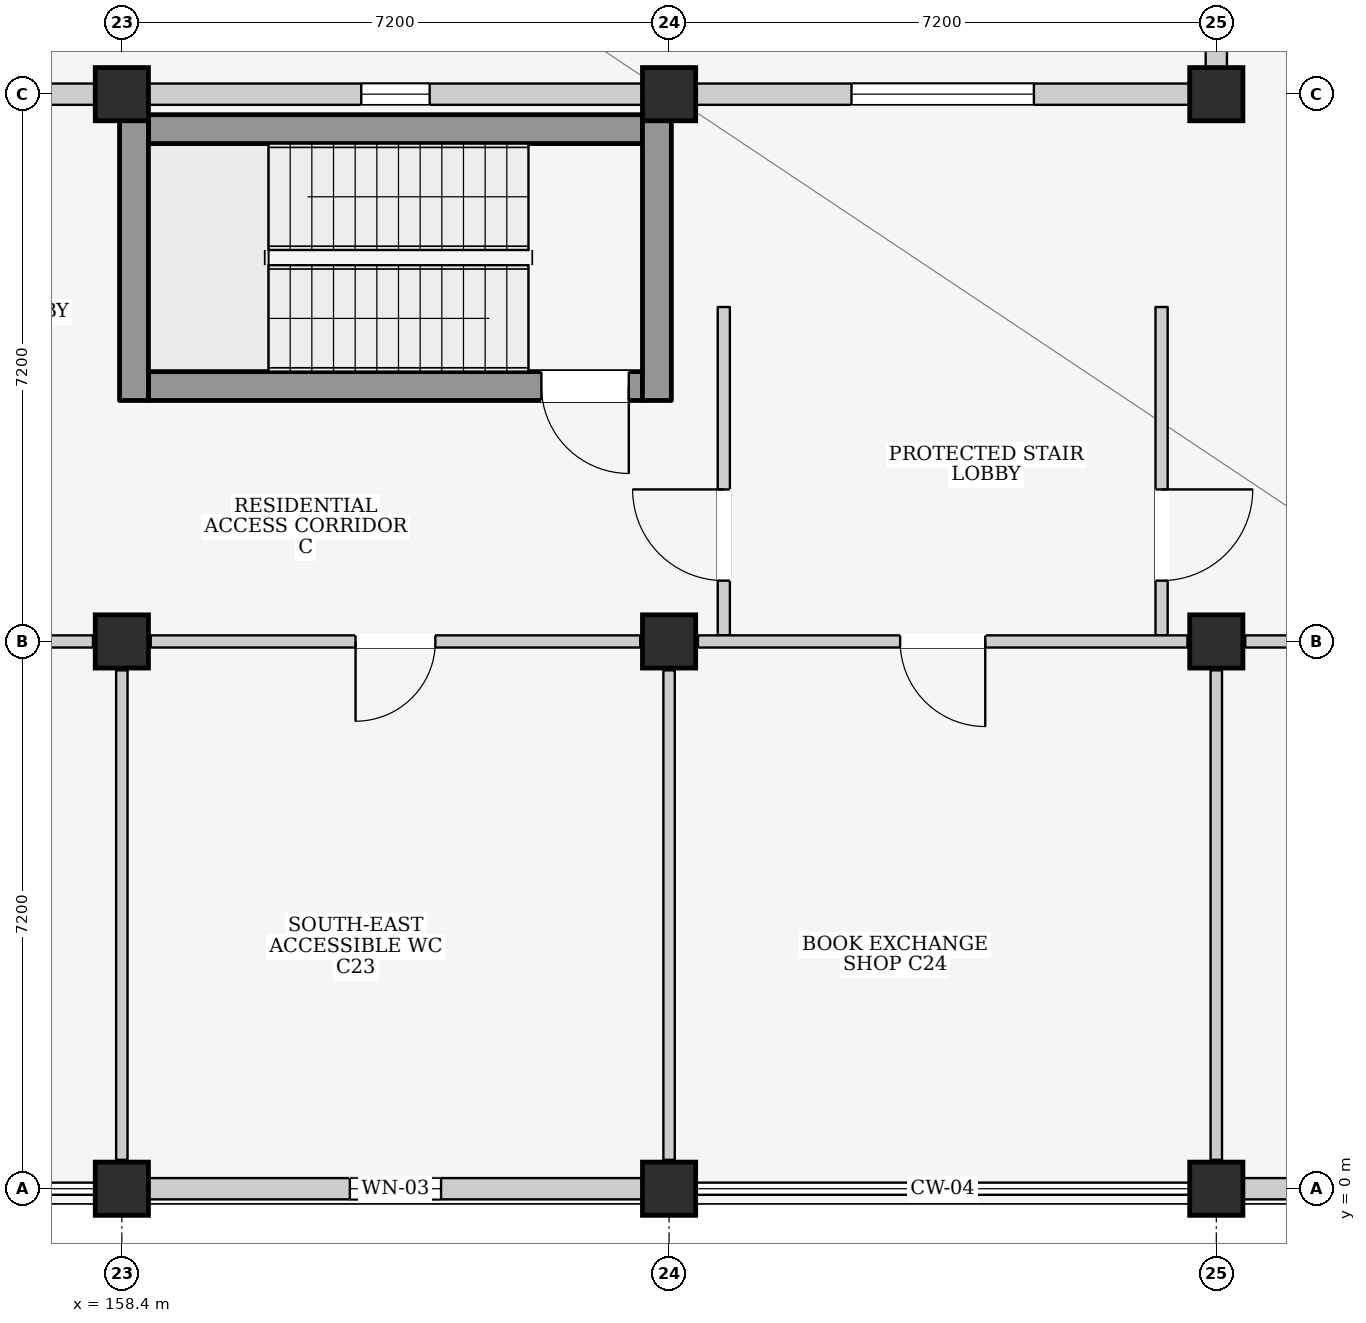
"""IFC4 building model, lengths in metres.
Left out: names, types, materials, properties, quantities, classifications, styles, units other than length and angle.
Written with IfcOpenShell. Run it as: python <this file> out.ifc"""

import sys

from ifc_helpers import new_model, si_unit, direction, frame, frame_2d, origin, origin_2d, place, context, subcontext, project, spatial, rectangle, extrude, element, fill, save


model = new_model("IFC4")
c1 = context("Model", 3, precision=1e-05, world=origin(), true_north=direction((0.0, 1.0)))
c2 = subcontext(c1, "Body", "Model", "MODEL_VIEW")
j1 = project(units=[si_unit("LENGTHUNIT", "METRE"), si_unit("PLANEANGLEUNIT", "RADIAN")], contexts=[c1])
p1 = place(None, origin())
s1 = spatial("IfcSite", under=j1, at=p1, CompositionType="ELEMENT")
p2 = place(p1, origin())
s2 = spatial("IfcBuilding", under=s1, at=p2, CompositionType="ELEMENT")
p3 = place(p2, origin())
s3 = spatial("IfcBuildingStorey", under=s2, at=p3, CompositionType="ELEMENT", Elevation=0.0)
for number, where, z_axis, x_axis in (
    (1, (158.4, 0.0, 0.0), (0.0, 0.0, 1.0), (1.0, 0.0, 0.0)),
    (2, (158.4, 7.2, 0.0), (0.0, 0.0, 1.0), (1.0, 0.0, 0.0)),
    (3, (158.4, 14.4, 0.0), (0.0, 0.0, 1.0), (1.0, 0.0, 0.0)),
    (4, (165.6, 0.0, 0.0), (0.0, 0.0, 1.0), (1.0, 0.0, 0.0)),
    (5, (165.6, 7.2, 0.0), (0.0, 0.0, 1.0), (1.0, 0.0, 0.0)),
    (6, (165.6, 14.4, 0.0), (0.0, 0.0, 1.0), (1.0, 0.0, 0.0)),
    (7, (172.8, 0.0, 0.0), (0.0, 0.0, 1.0), (1.0, 0.0, 0.0)),
    (8, (172.8, 7.2, 0.0), (0.0, 0.0, 1.0), (1.0, 0.0, 0.0)),
    (9, (172.8, 14.4, 0.0), (0.0, 0.0, 1.0), (1.0, 0.0, 0.0)),
):
    element("IfcColumn", number, at=place(p3, frame(where, z_axis=z_axis, x_axis=x_axis)), inside=s3, PredefinedType="COLUMN", context=c2, shape_type="SweptSolid", body=[
        extrude(rectangle(XDim=0.7, YDim=0.7, at=origin_2d()), origin(), (0.0, 0.0, 1.0), 4.5),
    ])
p4 = place(p3, frame((151.55, 14.4, 0.0), z_axis=(0.0, 0.0, 1.0), x_axis=(1.0, 0.0, 0.0)))
e10 = element("IfcWall", 10, at=p4, inside=s3, PredefinedType="ELEMENTEDWALL", context=c2, shape_type="SweptSolid", body=[
    extrude(rectangle(XDim=6.5, YDim=0.28, at=frame_2d((3.25, 0.0))), origin(), (0.0, 0.0, 1.0), 3.435),
])
p5 = place(p4, frame((2.6, 0.0, 0.0)))
e11 = element("IfcOpeningElement", 11, at=p5, cuts=e10, PredefinedType="OPENING", context=c2, shape_type="SweptSolid", body=[
    extrude(rectangle(XDim=1.2, YDim=2.15, at=frame_2d((0.6, 1.075))), frame((0.0, 0.155, 0.0), z_axis=(0.0, -1.0, 0.0), x_axis=(1.0, 0.0, 0.0)), (0.0, 0.0, 1.0), 0.31),
])
p6 = place(p3, frame((158.75, 0.0, 0.0), z_axis=(0.0, 0.0, 1.0), x_axis=(1.0, 0.0, 0.0)))
e12 = element("IfcWall", 12, at=p6, inside=s3, PredefinedType="ELEMENTEDWALL", context=c2, shape_type="SweptSolid", body=[
    extrude(rectangle(XDim=6.5, YDim=0.28, at=frame_2d((3.25, 0.0))), origin(), (0.0, 0.0, 1.0), 3.665),
])
p7 = place(p6, frame((2.65, 0.0, 0.95)))
e13 = element("IfcOpeningElement", 13, at=p7, cuts=e12, PredefinedType="OPENING", context=c2, shape_type="SweptSolid", body=[
    extrude(rectangle(XDim=1.2, YDim=1.35, at=frame_2d((0.6, 0.675))), frame((0.0, 0.155, 0.0), z_axis=(0.0, -1.0, 0.0), x_axis=(1.0, 0.0, 0.0)), (0.0, 0.0, 1.0), 0.31),
])
p8 = place(p3, frame((158.75, 14.4, 0.0), z_axis=(0.0, 0.0, 1.0), x_axis=(1.0, 0.0, 0.0)))
e14 = element("IfcWall", 14, at=p8, inside=s3, PredefinedType="ELEMENTEDWALL", context=c2, shape_type="SweptSolid", body=[
    extrude(rectangle(XDim=6.5, YDim=0.28, at=frame_2d((3.25, 0.0))), origin(), (0.0, 0.0, 1.0), 3.435),
])
p9 = place(p8, frame((2.8, 0.0, 0.95)))
e15 = element("IfcOpeningElement", 15, at=p9, cuts=e14, PredefinedType="OPENING", context=c2, shape_type="SweptSolid", body=[
    extrude(rectangle(XDim=0.9, YDim=1.1, at=frame_2d((0.45, 0.55))), frame((0.0, 0.155, 0.0), z_axis=(0.0, -1.0, 0.0), x_axis=(1.0, 0.0, 0.0)), (0.0, 0.0, 1.0), 0.31),
])
p10 = place(p3, frame((165.95, 14.4, 0.0), z_axis=(0.0, 0.0, 1.0), x_axis=(1.0, 0.0, 0.0)))
e16 = element("IfcWall", 16, at=p10, inside=s3, PredefinedType="ELEMENTEDWALL", context=c2, shape_type="SweptSolid", body=[
    extrude(rectangle(XDim=6.5, YDim=0.28, at=frame_2d((3.25, 0.0))), origin(), (0.0, 0.0, 1.0), 3.435),
])
p11 = place(p10, frame((2.05, 0.0, 0.95)))
e17 = element("IfcOpeningElement", 17, at=p11, cuts=e16, PredefinedType="OPENING", context=c2, shape_type="SweptSolid", body=[
    extrude(rectangle(XDim=2.4, YDim=1.65, at=frame_2d((1.2, 0.825))), frame((0.0, 0.155, 0.0), z_axis=(0.0, -1.0, 0.0), x_axis=(1.0, 0.0, 0.0)), (0.0, 0.0, 1.0), 0.31),
])
p12 = place(p3, frame((173.15, 0.0, 0.0), z_axis=(0.0, 0.0, 1.0), x_axis=(1.0, 0.0, 0.0)))
e18 = element("IfcWall", 18, at=p12, inside=s3, PredefinedType="ELEMENTEDWALL", context=c2, shape_type="SweptSolid", body=[
    extrude(rectangle(XDim=6.5, YDim=0.28, at=frame_2d((3.25, 0.0))), origin(), (0.0, 0.0, 1.0), 3.665),
])
p13 = place(p12, frame((1.2, 0.0, 0.0)))
e19 = element("IfcOpeningElement", 19, at=p13, cuts=e18, PredefinedType="OPENING", context=c2, shape_type="SweptSolid", body=[
    extrude(rectangle(XDim=1.1, YDim=2.2, at=frame_2d((0.55, 1.1))), frame((0.0, 0.155, 0.0), z_axis=(0.0, -1.0, 0.0), x_axis=(1.0, 0.0, 0.0)), (0.0, 0.0, 1.0), 0.31),
])
p14 = place(p12, frame((2.9, 0.0, 0.85)))
e20 = element("IfcOpeningElement", 20, at=p14, cuts=e18, PredefinedType="OPENING", context=c2, shape_type="SweptSolid", body=[
    extrude(rectangle(XDim=2.2, YDim=1.8, at=frame_2d((1.1, 0.9))), frame((0.0, 0.155, 0.0), z_axis=(0.0, -1.0, 0.0), x_axis=(1.0, 0.0, 0.0)), (0.0, 0.0, 1.0), 0.31),
])
p15 = place(p3, frame((172.8, 14.75, 0.0), z_axis=(0.0, 0.0, 1.0), x_axis=(0.0, 1.0, 0.0)))
e21 = element("IfcWall", 21, at=p15, inside=s3, PredefinedType="ELEMENTEDWALL", context=c2, shape_type="SweptSolid", body=[
    extrude(rectangle(XDim=6.5, YDim=0.28, at=frame_2d((3.25, 0.0))), origin(), (0.0, 0.0, 1.0), 3.435),
])
p16 = place(p15, frame((2.55, 0.0, 0.95)))
e22 = element("IfcOpeningElement", 22, at=p16, cuts=e21, PredefinedType="OPENING", context=c2, shape_type="SweptSolid", body=[
    extrude(rectangle(XDim=1.4, YDim=1.2, at=frame_2d((0.7, 0.6))), frame((0.0, 0.155, 0.0), z_axis=(0.0, -1.0, 0.0), x_axis=(1.0, 0.0, 0.0)), (0.0, 0.0, 1.0), 0.31),
])
p17 = place(p3, frame((158.75, 10.56, 0.0), z_axis=(0.0, 0.0, 1.0), x_axis=(1.0, 0.0, 0.0)))
e23 = element("IfcWall", 23, at=p17, inside=s3, PredefinedType="SHEAR", context=c2, shape_type="SweptSolid", body=[
    extrude(rectangle(XDim=6.5, YDim=0.38, at=frame_2d((3.25, 0.0))), origin(), (0.0, 0.0, 1.0), 4.2),
])
p18 = place(p17, frame((5.17, 0.0, 0.0)))
e24 = element("IfcOpeningElement", 24, at=p18, cuts=e23, PredefinedType="OPENING", context=c2, shape_type="SweptSolid", body=[
    extrude(rectangle(XDim=1.15, YDim=2.2, at=frame_2d((0.575, 1.1))), frame((0.0, 0.205, 0.0), z_axis=(0.0, -1.0, 0.0), x_axis=(1.0, 0.0, 0.0)), (0.0, 0.0, 1.0), 0.41),
])
p19 = place(p3, frame((158.75, 13.94, 0.0), z_axis=(0.0, 0.0, 1.0), x_axis=(1.0, 0.0, 0.0)))
e25 = element("IfcWall", 25, at=p19, inside=s3, PredefinedType="SHEAR", context=c2, shape_type="SweptSolid", body=[
    extrude(rectangle(XDim=6.5, YDim=0.38, at=frame_2d((3.25, 0.0))), origin(), (0.0, 0.0, 1.0), 4.2),
])
for number, where, z_axis, x_axis in (
    (26, (158.56, 10.37, 0.0), (0.0, 0.0, 1.0), (0.0, 1.0, 0.0)),
    (27, (165.44, 10.37, 0.0), (0.0, 0.0, 1.0), (0.0, 1.0, 0.0)),
):
    element("IfcWall", number, at=place(p3, frame(where, z_axis=z_axis, x_axis=x_axis)), inside=s3, PredefinedType="SHEAR", context=c2, shape_type="SweptSolid", body=[
        extrude(rectangle(XDim=3.76, YDim=0.38, at=frame_2d((1.88, 0.0))), origin(), (0.0, 0.0, 1.0), 4.2),
    ])
p20 = place(p3, frame((166.32, 7.28, 0.0), z_axis=(0.0, 0.0, 1.0), x_axis=(0.0, 1.0, 0.0)))
e28 = element("IfcWall", 28, at=p20, inside=s3, PredefinedType="PARTITIONING", context=c2, shape_type="SweptSolid", body=[
    extrude(rectangle(XDim=4.32, YDim=0.16, at=frame_2d((2.16, 0.0))), origin(), (0.0, 0.0, 1.0), 4.2),
])
p21 = place(p20, frame((0.72, 0.0, 0.0)))
e29 = element("IfcOpeningElement", 29, at=p21, cuts=e28, PredefinedType="OPENING", context=c2, shape_type="SweptSolid", body=[
    extrude(rectangle(XDim=1.2, YDim=2.2, at=frame_2d((0.6, 1.1))), frame((0.0, 0.095, 0.0), z_axis=(0.0, -1.0, 0.0), x_axis=(1.0, 0.0, 0.0)), (0.0, 0.0, 1.0), 0.19),
])
p22 = place(p3, frame((172.08, 7.28, 0.0), z_axis=(0.0, 0.0, 1.0), x_axis=(0.0, 1.0, 0.0)))
e30 = element("IfcWall", 30, at=p22, inside=s3, PredefinedType="PARTITIONING", context=c2, shape_type="SweptSolid", body=[
    extrude(rectangle(XDim=4.32, YDim=0.16, at=frame_2d((2.16, 0.0))), origin(), (0.0, 0.0, 1.0), 4.2),
])
p23 = place(p22, frame((0.72, 0.0, 0.0)))
e31 = element("IfcOpeningElement", 31, at=p23, cuts=e30, PredefinedType="OPENING", context=c2, shape_type="SweptSolid", body=[
    extrude(rectangle(XDim=1.2, YDim=2.2, at=frame_2d((0.6, 1.1))), frame((0.0, 0.095, 0.0), z_axis=(0.0, -1.0, 0.0), x_axis=(1.0, 0.0, 0.0)), (0.0, 0.0, 1.0), 0.19),
])
p24 = place(p3, frame((151.58, 7.2, 0.0), z_axis=(0.0, 0.0, 1.0), x_axis=(1.0, 0.0, 0.0)))
e32 = element("IfcWall", 32, at=p24, inside=s3, PredefinedType="PARTITIONING", context=c2, shape_type="SweptSolid", body=[
    extrude(rectangle(XDim=6.44, YDim=0.16, at=frame_2d((3.22, 0.0))), origin(), (0.0, 0.0, 1.0), 3.435),
])
p25 = place(p24, frame((2.695, 0.0, 0.0)))
e33 = element("IfcOpeningElement", 33, at=p25, cuts=e32, PredefinedType="OPENING", context=c2, shape_type="SweptSolid", body=[
    extrude(rectangle(XDim=1.05, YDim=2.15, at=frame_2d((0.525, 1.075))), frame((0.0, 0.095, 0.0), z_axis=(0.0, -1.0, 0.0), x_axis=(1.0, 0.0, 0.0)), (0.0, 0.0, 1.0), 0.19),
])
p26 = place(p3, frame((158.4, 0.38, 0.0), z_axis=(0.0, 0.0, 1.0), x_axis=(0.0, 1.0, 0.0)))
e34 = element("IfcWall", 34, at=p26, inside=s3, PredefinedType="PARTITIONING", context=c2, shape_type="SweptSolid", body=[
    extrude(rectangle(XDim=6.44, YDim=0.15, at=frame_2d((3.22, 0.0))), origin(), (0.0, 0.0, 1.0), 3.435),
])
p27 = place(p3, frame((158.78, 7.2, 0.0), z_axis=(0.0, 0.0, 1.0), x_axis=(1.0, 0.0, 0.0)))
e35 = element("IfcWall", 35, at=p27, inside=s3, PredefinedType="PARTITIONING", context=c2, shape_type="SweptSolid", body=[
    extrude(rectangle(XDim=6.44, YDim=0.16, at=frame_2d((3.22, 0.0))), origin(), (0.0, 0.0, 1.0), 3.435),
])
p28 = place(p27, frame((2.695, 0.0, 0.0)))
e36 = element("IfcOpeningElement", 36, at=p28, cuts=e35, PredefinedType="OPENING", context=c2, shape_type="SweptSolid", body=[
    extrude(rectangle(XDim=1.05, YDim=2.15, at=frame_2d((0.525, 1.075))), frame((0.0, 0.095, 0.0), z_axis=(0.0, -1.0, 0.0), x_axis=(1.0, 0.0, 0.0)), (0.0, 0.0, 1.0), 0.19),
])
p29 = place(p3, frame((165.6, 0.38, 0.0), z_axis=(0.0, 0.0, 1.0), x_axis=(0.0, 1.0, 0.0)))
e37 = element("IfcWall", 37, at=p29, inside=s3, PredefinedType="PARTITIONING", context=c2, shape_type="SweptSolid", body=[
    extrude(rectangle(XDim=6.44, YDim=0.15, at=frame_2d((3.22, 0.0))), origin(), (0.0, 0.0, 1.0), 3.435),
])
p30 = place(p3, frame((165.98, 7.2, 0.0), z_axis=(0.0, 0.0, 1.0), x_axis=(1.0, 0.0, 0.0)))
e38 = element("IfcWall", 38, at=p30, inside=s3, PredefinedType="PARTITIONING", context=c2, shape_type="SweptSolid", body=[
    extrude(rectangle(XDim=6.44, YDim=0.16, at=frame_2d((3.22, 0.0))), origin(), (0.0, 0.0, 1.0), 3.435),
])
p31 = place(p30, frame((2.66, 0.0, 0.0)))
e39 = element("IfcOpeningElement", 39, at=p31, cuts=e38, PredefinedType="OPENING", context=c2, shape_type="SweptSolid", body=[
    extrude(rectangle(XDim=1.12, YDim=2.2, at=frame_2d((0.56, 1.1))), frame((0.0, 0.095, 0.0), z_axis=(0.0, -1.0, 0.0), x_axis=(1.0, 0.0, 0.0)), (0.0, 0.0, 1.0), 0.19),
])
p32 = place(p3, frame((172.8, 0.38, 0.0), z_axis=(0.0, 0.0, 1.0), x_axis=(0.0, 1.0, 0.0)))
e40 = element("IfcWall", 40, at=p32, inside=s3, PredefinedType="PARTITIONING", context=c2, shape_type="SweptSolid", body=[
    extrude(rectangle(XDim=6.44, YDim=0.15, at=frame_2d((3.22, 0.0))), origin(), (0.0, 0.0, 1.0), 3.435),
])
p33 = place(p3, frame((173.18, 7.2, 0.0), z_axis=(0.0, 0.0, 1.0), x_axis=(1.0, 0.0, 0.0)))
e41 = element("IfcWall", 41, at=p33, inside=s3, PredefinedType="PARTITIONING", context=c2, shape_type="SweptSolid", body=[
    extrude(rectangle(XDim=6.44, YDim=0.16, at=frame_2d((3.22, 0.0))), origin(), (0.0, 0.0, 1.0), 3.435),
])
p34 = place(p33, frame((2.66, 0.0, 0.0)))
e42 = element("IfcOpeningElement", 42, at=p34, cuts=e41, PredefinedType="OPENING", context=c2, shape_type="SweptSolid", body=[
    extrude(rectangle(XDim=1.12, YDim=2.2, at=frame_2d((0.56, 1.1))), frame((0.0, 0.095, 0.0), z_axis=(0.0, -1.0, 0.0), x_axis=(1.0, 0.0, 0.0)), (0.0, 0.0, 1.0), 0.19),
])
p35 = place(p7, origin())
e43 = element("IfcWindow", 43, at=p35, inside=s3, PartitioningType="SINGLE_PANEL", PredefinedType="WINDOW", context=c2, shape_type="SweptSolid", body=[
    extrude(rectangle(XDim=1.2, YDim=1.35, at=frame_2d((0.6, 0.675))), frame((0.0, 0.03, 0.0), z_axis=(0.0, -1.0, 0.0), x_axis=(1.0, 0.0, 0.0)), (0.0, 0.0, 1.0), 0.06),
])
fill(e13, e43)
p36 = place(p9, origin())
e44 = element("IfcWindow", 44, at=p36, inside=s3, PartitioningType="SINGLE_PANEL", PredefinedType="WINDOW", context=c2, shape_type="SweptSolid", body=[
    extrude(rectangle(XDim=0.9, YDim=1.1, at=frame_2d((0.45, 0.55))), frame((0.0, 0.03, 0.0), z_axis=(0.0, -1.0, 0.0), x_axis=(1.0, 0.0, 0.0)), (0.0, 0.0, 1.0), 0.06),
])
fill(e15, e44)
p37 = place(p11, origin())
e45 = element("IfcWindow", 45, at=p37, inside=s3, PartitioningType="TRIPLE_PANEL_VERTICAL", PredefinedType="WINDOW", context=c2, shape_type="SweptSolid", body=[
    extrude(rectangle(XDim=2.4, YDim=1.65, at=frame_2d((1.2, 0.825))), frame((0.0, 0.03, 0.0), z_axis=(0.0, -1.0, 0.0), x_axis=(1.0, 0.0, 0.0)), (0.0, 0.0, 1.0), 0.06),
])
fill(e17, e45)
p38 = place(p18, frame((1.15, 0.0, 0.0), z_axis=(0.0, 0.0, 1.0), x_axis=(-1.0, 0.0, 0.0)))
e46 = element("IfcDoor", 46, at=p38, inside=s3, OperationType="SINGLE_SWING_LEFT", PredefinedType="DOOR", context=c2, shape_type="SweptSolid", body=[
    extrude(rectangle(XDim=1.15, YDim=2.2, at=frame_2d((0.575, 1.1))), frame((0.0, 0.025, 0.0), z_axis=(0.0, -1.0, 0.0), x_axis=(1.0, 0.0, 0.0)), (0.0, 0.0, 1.0), 0.05),
])
fill(e24, e46)
p39 = place(p21, origin())
e47 = element("IfcDoor", 47, at=p39, inside=s3, OperationType="SINGLE_SWING_RIGHT", PredefinedType="DOOR", context=c2, shape_type="SweptSolid", body=[
    extrude(rectangle(XDim=1.2, YDim=2.2, at=frame_2d((0.6, 1.1))), frame((0.0, 0.025, 0.0), z_axis=(0.0, -1.0, 0.0), x_axis=(1.0, 0.0, 0.0)), (0.0, 0.0, 1.0), 0.05),
])
fill(e29, e47)
p40 = place(p23, frame((1.2, 0.0, 0.0), z_axis=(0.0, 0.0, 1.0), x_axis=(-1.0, 0.0, 0.0)))
e48 = element("IfcDoor", 48, at=p40, inside=s3, OperationType="SINGLE_SWING_LEFT", PredefinedType="DOOR", context=c2, shape_type="SweptSolid", body=[
    extrude(rectangle(XDim=1.2, YDim=2.2, at=frame_2d((0.6, 1.1))), frame((0.0, 0.025, 0.0), z_axis=(0.0, -1.0, 0.0), x_axis=(1.0, 0.0, 0.0)), (0.0, 0.0, 1.0), 0.05),
])
fill(e31, e48)
p41 = place(p28, frame((1.05, 0.0, 0.0), z_axis=(0.0, 0.0, 1.0), x_axis=(-1.0, 0.0, 0.0)))
e49 = element("IfcDoor", 49, at=p41, inside=s3, OperationType="SINGLE_SWING_RIGHT", PredefinedType="DOOR", context=c2, shape_type="SweptSolid", body=[
    extrude(rectangle(XDim=1.05, YDim=2.15, at=frame_2d((0.525, 1.075))), frame((0.0, 0.025, 0.0), z_axis=(0.0, -1.0, 0.0), x_axis=(1.0, 0.0, 0.0)), (0.0, 0.0, 1.0), 0.05),
])
fill(e36, e49)
p42 = place(p31, frame((1.12, 0.0, 0.0), z_axis=(0.0, 0.0, 1.0), x_axis=(-1.0, 0.0, 0.0)))
e50 = element("IfcDoor", 50, at=p42, inside=s3, OperationType="SINGLE_SWING_LEFT", PredefinedType="DOOR", context=c2, shape_type="SweptSolid", body=[
    extrude(rectangle(XDim=1.12, YDim=2.2, at=frame_2d((0.56, 1.1))), frame((0.0, 0.025, 0.0), z_axis=(0.0, -1.0, 0.0), x_axis=(1.0, 0.0, 0.0)), (0.0, 0.0, 1.0), 0.05),
])
fill(e39, e50)
save(model, sys.argv[1])
